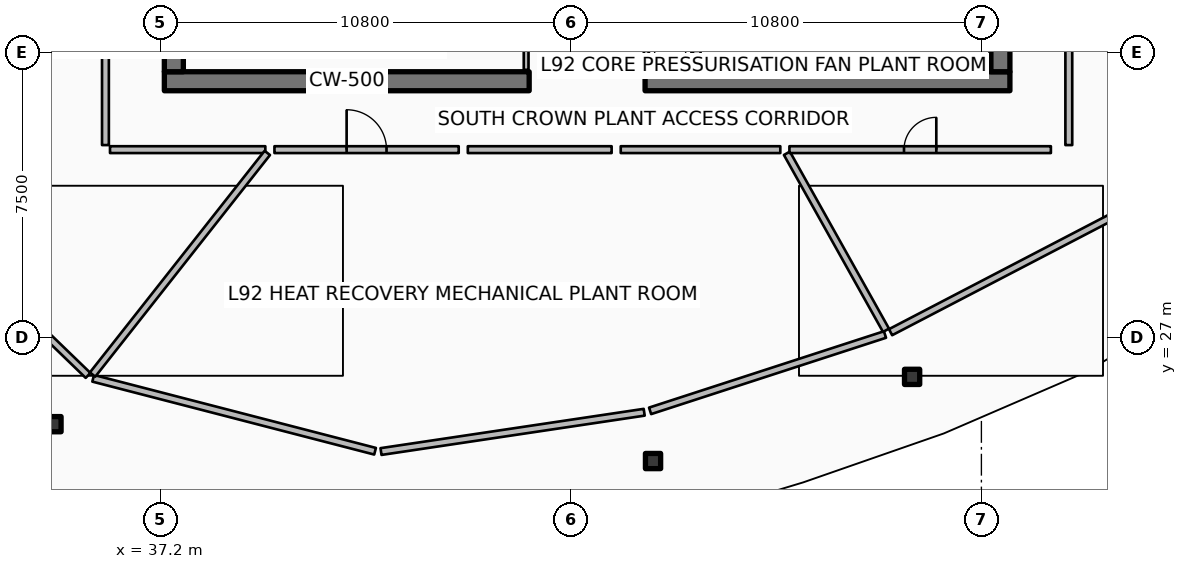
"""IFC4 building model, lengths in metres.
Left out: names, types, materials, properties, quantities, classifications, styles, units other than length and angle.
Written with IfcOpenShell. Run it as: python <this file> out.ifc"""

import sys

from ifc_helpers import new_model, si_unit, direction, frame, frame_2d, origin, origin_2d, place, context, subcontext, project, spatial, rectangle, hollow_rectangle, extrude, element, fill, save


model = new_model("IFC4")
c1 = context("Model", 3, precision=1e-05, world=origin(), true_north=direction((0.0, 1.0)))
c2 = subcontext(c1, "Body", "Model", "MODEL_VIEW")
j1 = project(units=[si_unit("LENGTHUNIT", "METRE"), si_unit("PLANEANGLEUNIT", "RADIAN")], contexts=[c1])
p1 = place(None, origin())
s1 = spatial("IfcSite", under=j1, at=p1, CompositionType="ELEMENT")
p2 = place(p1, origin())
s2 = spatial("IfcBuilding", under=s1, at=p2, CompositionType="ELEMENT")
p3 = place(p2, frame((0.0, 0.0, 366.8)))
s3 = spatial("IfcBuildingStorey", under=s2, at=p3, CompositionType="ELEMENT", Elevation=366.8)
p4 = place(p3, frame((37.3, 33.75, 0.0), z_axis=(0.0, 0.0, 1.0), x_axis=(1.0, 0.0, 0.0)))
e1 = element("IfcWall", 1, at=p4, inside=s3, PredefinedType="SHEAR", context=c2, shape_type="SweptSolid", body=[
    extrude(rectangle(XDim=9.6, YDim=0.5, at=frame_2d((4.8, 0.0))), origin(), (0.0, 0.0, 1.0), 3.6),
])
p5 = place(p3, frame((49.95, 33.75, 0.0), z_axis=(0.0, 0.0, 1.0), x_axis=(1.0, 0.0, 0.0)))
e2 = element("IfcWall", 2, at=p5, inside=s3, PredefinedType="SHEAR", context=c2, shape_type="SweptSolid", body=[
    extrude(rectangle(XDim=9.6, YDim=0.5, at=frame_2d((4.8, 0.0))), origin(), (0.0, 0.0, 1.0), 3.6),
])
for number, where, z_axis, x_axis in (
    (3, (37.55, 34.0, 0.0), (0.0, 0.0, 1.0), (0.0, 1.0, 0.0)),
    (4, (59.3, 34.0, 0.0), (0.0, 0.0, 1.0), (0.0, 1.0, 0.0)),
):
    element("IfcWall", number, at=place(p3, frame(where, z_axis=z_axis, x_axis=x_axis)), inside=s3, PredefinedType="SHEAR", context=c2, shape_type="SweptSolid", body=[
        extrude(rectangle(XDim=16.0, YDim=0.5, at=frame_2d((8.0, 0.0))), origin(), (0.0, 0.0, 1.0), 3.6),
    ])
for number, where, z_axis, x_axis in (
    (5, (34.383, 24.726, 0.0), (0.0, 0.0, 1.0), (1.0, 0.0, 0.0)),
    (6, (50.159, 23.756, 0.0), (0.0, 0.0, 1.0), (1.0, 0.0, 0.0)),
    (7, (56.977, 25.971, 0.0), (0.0, 0.0, 1.0), (1.0, 0.0, 0.0)),
):
    element("IfcColumn", number, at=place(p3, frame(where, z_axis=z_axis, x_axis=x_axis)), inside=s3, PredefinedType="COLUMN", context=c2, shape_type="SweptSolid", body=[
        extrude(hollow_rectangle(XDim=0.4, YDim=0.4, WallThickness=0.02, InnerFilletRadius=0.02, OuterFilletRadius=0.04, at=origin_2d()), origin(), (0.0, 0.0, 1.0), 3.32),
    ])
p6 = place(p3, frame((51.31, 34.05, 0.0), z_axis=(0.0, 0.0, 1.0), x_axis=(0.0, 1.0, 0.0)))
e8 = element("IfcWall", 8, at=p6, inside=s3, PredefinedType="PARTITIONING", context=c2, shape_type="SweptSolid", body=[
    extrude(rectangle(XDim=3.21, YDim=0.2, at=frame_2d((1.605, 0.0))), origin(), (0.0, 0.0, 1.0), 3.32),
])
p7 = place(p3, frame((46.82, 34.05, 0.0), z_axis=(0.0, 0.0, 1.0), x_axis=(0.0, 1.0, 0.0)))
e9 = element("IfcWall", 9, at=p7, inside=s3, PredefinedType="PARTITIONING", context=c2, shape_type="SweptSolid", body=[
    extrude(rectangle(XDim=2.03, YDim=0.125, at=frame_2d((1.015, 0.0))), origin(), (0.0, 0.0, 1.0), 2.76),
])
p8 = place(p3, frame((49.98, 34.06, 0.0), z_axis=(0.0, 0.0, 1.0), x_axis=(0.0, 1.0, 0.0)))
e10 = element("IfcWall", 10, at=p8, inside=s3, PredefinedType="PARTITIONING", context=c2, shape_type="SweptSolid", body=[
    extrude(rectangle(XDim=3.4, YDim=0.125, at=frame_2d((1.7, 0.0))), origin(), (0.0, 0.0, 1.0), 2.76),
])
p9 = place(p3, frame((29.533, 31.57, 0.0), z_axis=(0.0, 0.0, 1.0), x_axis=(0.719364153135, -0.694633151516, 0.0)))
e11 = element("IfcWall", 11, at=p9, inside=s3, PredefinedType="PARTITIONING", context=c2, shape_type="SweptSolid", body=[
    extrude(rectangle(XDim=8.006, YDim=0.18, at=frame_2d((4.003, 0.0))), origin(), (0.0, 0.0, 1.0), 2.76),
])
p10 = place(p3, frame((35.427, 25.934, 0.0), z_axis=(0.0, 0.0, 1.0), x_axis=(0.968117205342, -0.250497658115, 0.0)))
e12 = element("IfcWall", 12, at=p10, inside=s3, PredefinedType="PARTITIONING", context=c2, shape_type="SweptSolid", body=[
    extrude(rectangle(XDim=7.662, YDim=0.18, at=frame_2d((3.831, 0.0))), origin(), (0.0, 0.0, 1.0), 2.76),
])
p11 = place(p3, frame((43.001, 24.006, 0.0), z_axis=(0.0, 0.0, 1.0), x_axis=(0.989034336252, 0.147685753256, 0.0)))
e13 = element("IfcWall", 13, at=p11, inside=s3, PredefinedType="PARTITIONING", context=c2, shape_type="SweptSolid", body=[
    extrude(rectangle(XDim=7.003, YDim=0.18, at=frame_2d((3.501, 0.0))), origin(), (0.0, 0.0, 1.0), 2.76),
])
p12 = place(p3, frame((50.082, 25.077, 0.0), z_axis=(0.0, 0.0, 1.0), x_axis=(0.95105283999, 0.309028308649, 0.0)))
e14 = element("IfcWall", 14, at=p12, inside=s3, PredefinedType="PARTITIONING", context=c2, shape_type="SweptSolid", body=[
    extrude(rectangle(XDim=6.499, YDim=0.18, at=frame_2d((3.25, 0.0))), origin(), (0.0, 0.0, 1.0), 2.76),
])
p13 = place(p3, frame((56.41, 27.147, 0.0), z_axis=(0.0, 0.0, 1.0), x_axis=(0.886949494865, 0.461866423935, 0.0)))
e15 = element("IfcWall", 15, at=p13, inside=s3, PredefinedType="PARTITIONING", context=c2, shape_type="SweptSolid", body=[
    extrude(rectangle(XDim=7.002, YDim=0.18, at=frame_2d((3.501, 0.0))), origin(), (0.0, 0.0, 1.0), 2.76),
])
p14 = place(p3, frame((35.75, 35.02, 0.0), z_axis=(0.0, 0.0, 1.0), x_axis=(0.0, -1.0, 0.0)))
e16 = element("IfcWall", 16, at=p14, inside=s3, PredefinedType="PARTITIONING", context=c2, shape_type="SweptSolid", body=[
    extrude(rectangle(XDim=2.95, YDim=0.18, at=frame_2d((1.475, 0.0))), origin(), (0.0, 0.0, 1.0), 2.76),
])
p15 = place(p3, frame((35.87, 31.95, 0.0), z_axis=(0.0, 0.0, 1.0), x_axis=(1.0, 0.0, 0.0)))
e17 = element("IfcWall", 17, at=p15, inside=s3, PredefinedType="PARTITIONING", context=c2, shape_type="SweptSolid", body=[
    extrude(rectangle(XDim=4.087, YDim=0.18, at=frame_2d((2.043, 0.0))), origin(), (0.0, 0.0, 1.0), 2.76),
])
p16 = place(p3, frame((40.009, 31.864, 0.0), z_axis=(0.0, 0.0, 1.0), x_axis=(-0.619089811342, -0.785320192974, 0.0)))
e18 = element("IfcWall", 18, at=p16, inside=s3, PredefinedType="PARTITIONING", context=c2, shape_type="SweptSolid", body=[
    extrude(rectangle(XDim=7.426, YDim=0.18, at=frame_2d((3.713, 0.0))), origin(), (0.0, 0.0, 1.0), 2.76),
])
p17 = place(p3, frame((40.197, 31.95, 0.0), z_axis=(0.0, 0.0, 1.0), x_axis=(1.0, 0.0, 0.0)))
e19 = element("IfcWall", 19, at=p17, inside=s3, PredefinedType="PARTITIONING", context=c2, shape_type="SweptSolid", body=[
    extrude(rectangle(XDim=4.848, YDim=0.18, at=frame_2d((2.424, 0.0))), origin(), (0.0, 0.0, 1.0), 2.76),
])
p18 = place(p17, frame((1.899, 0.0, 0.0)))
e20 = element("IfcOpeningElement", 20, at=p18, cuts=e19, PredefinedType="OPENING", context=c2, shape_type="SweptSolid", body=[
    extrude(rectangle(XDim=1.05, YDim=2.1, at=frame_2d((0.525, 1.05))), frame((0.0, 0.1, 0.0), z_axis=(0.0, -1.0, 0.0), x_axis=(1.0, 0.0, 0.0)), (0.0, 0.0, 1.0), 0.2),
])
p19 = place(p3, frame((45.286, 31.95, 0.0), z_axis=(0.0, 0.0, 1.0), x_axis=(1.0, 0.0, 0.0)))
e21 = element("IfcWall", 21, at=p19, inside=s3, PredefinedType="PARTITIONING", context=c2, shape_type="SweptSolid", body=[
    extrude(rectangle(XDim=3.784, YDim=0.18, at=frame_2d((1.892, 0.0))), origin(), (0.0, 0.0, 1.0), 2.76),
])
p20 = place(p3, frame((49.31, 31.95, 0.0), z_axis=(0.0, 0.0, 1.0), x_axis=(1.0, 0.0, 0.0)))
e22 = element("IfcWall", 22, at=p20, inside=s3, PredefinedType="PARTITIONING", context=c2, shape_type="SweptSolid", body=[
    extrude(rectangle(XDim=4.199, YDim=0.18, at=frame_2d((2.099, 0.0))), origin(), (0.0, 0.0, 1.0), 2.76),
])
p21 = place(p3, frame((53.682, 31.854, 0.0), z_axis=(0.0, 0.0, 1.0), x_axis=(0.488622869326, -0.872495095443, 0.0)))
e23 = element("IfcWall", 23, at=p21, inside=s3, PredefinedType="PARTITIONING", context=c2, shape_type="SweptSolid", body=[
    extrude(rectangle(XDim=5.337, YDim=0.18, at=frame_2d((2.668, 0.0))), origin(), (0.0, 0.0, 1.0), 2.76),
])
p22 = place(p3, frame((53.748, 31.95, 0.0), z_axis=(0.0, 0.0, 1.0), x_axis=(1.0, 0.0, 0.0)))
e24 = element("IfcWall", 24, at=p22, inside=s3, PredefinedType="PARTITIONING", context=c2, shape_type="SweptSolid", body=[
    extrude(rectangle(XDim=6.88, YDim=0.18, at=frame_2d((3.44, 0.0))), origin(), (0.0, 0.0, 1.0), 2.76),
])
p23 = place(p22, frame((3.015, 0.0, 0.0)))
e25 = element("IfcOpeningElement", 25, at=p23, cuts=e24, PredefinedType="OPENING", context=c2, shape_type="SweptSolid", body=[
    extrude(rectangle(XDim=0.85, YDim=2.06, at=frame_2d((0.425, 1.03))), frame((0.0, 0.1, 0.0), z_axis=(0.0, -1.0, 0.0), x_axis=(1.0, 0.0, 0.0)), (0.0, 0.0, 1.0), 0.2),
])
p24 = place(p3, frame((61.1, 32.07, 0.0), z_axis=(0.0, 0.0, 1.0), x_axis=(0.0, 1.0, 0.0)))
e26 = element("IfcWall", 26, at=p24, inside=s3, PredefinedType="PARTITIONING", context=c2, shape_type="SweptSolid", body=[
    extrude(rectangle(XDim=6.115, YDim=0.18, at=frame_2d((3.058, 0.0))), origin(), (0.0, 0.0, 1.0), 2.76),
])
p25 = place(p18, origin())
e27 = element("IfcDoor", 27, at=p25, inside=s3, OperationType="SINGLE_SWING_LEFT", PredefinedType="DOOR", context=c2, shape_type="SweptSolid", body=[
    extrude(rectangle(XDim=1.05, YDim=2.1, at=frame_2d((0.525, 1.05))), frame((0.0, 0.025, 0.0), z_axis=(0.0, -1.0, 0.0), x_axis=(1.0, 0.0, 0.0)), (0.0, 0.0, 1.0), 0.05),
])
fill(e20, e27)
p26 = place(p23, origin())
e28 = element("IfcDoor", 28, at=p26, inside=s3, OperationType="SINGLE_SWING_RIGHT", PredefinedType="DOOR", context=c2, shape_type="SweptSolid", body=[
    extrude(rectangle(XDim=0.85, YDim=2.06, at=frame_2d((0.425, 1.03))), frame((0.0, 0.025, 0.0), z_axis=(0.0, -1.0, 0.0), x_axis=(1.0, 0.0, 0.0)), (0.0, 0.0, 1.0), 0.05),
])
fill(e25, e28)
save(model, sys.argv[1])
